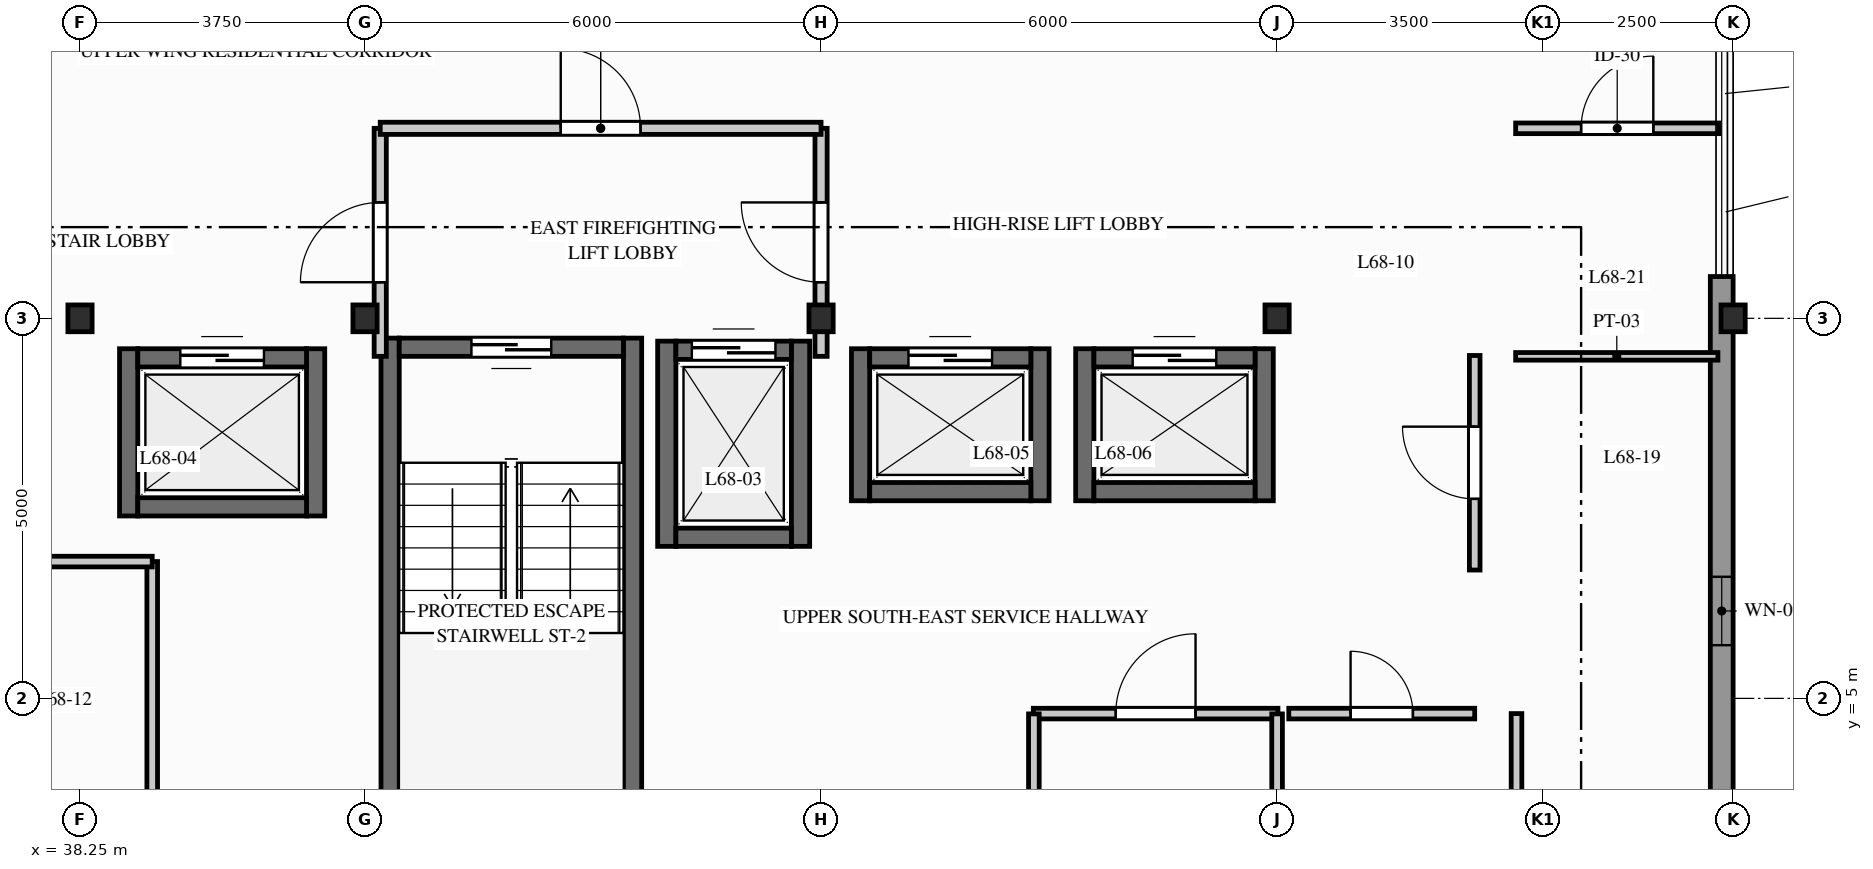
"""IFC4 building model, lengths in metres.
Left out: names, types, materials, properties, quantities, classifications, styles, units other than length and angle.
Written with IfcOpenShell. Run it as: python <this file> out.ifc"""

import sys

from ifc_helpers import new_model, si_unit, direction, frame, frame_2d, origin, origin_2d, place, context, subcontext, project, spatial, rectangle, i_section, extrude, element, fill, save


model = new_model("IFC4")
c1 = context("Model", 3, precision=1e-05, world=origin(), true_north=direction((0.0, 1.0)))
c2 = subcontext(c1, "Body", "Model", "MODEL_VIEW")
j1 = project(units=[si_unit("LENGTHUNIT", "METRE"), si_unit("PLANEANGLEUNIT", "RADIAN")], contexts=[c1])
p1 = place(None, origin())
s1 = spatial("IfcSite", under=j1, at=p1, CompositionType="ELEMENT")
p2 = place(p1, origin())
s2 = spatial("IfcBuilding", under=s1, at=p2, CompositionType="ELEMENT")
p3 = place(p2, frame((0.0, 0.0, 224.2)))
s3 = spatial("IfcBuildingStorey", under=s2, at=p3, CompositionType="ELEMENT", Elevation=224.2)
for number, where, z_axis, x_axis in (
    (1, (38.25, 10.0, 0.0), (0.0, 0.0, 1.0), (1.0, 0.0, 0.0)),
    (2, (42.0, 10.0, 0.0), (0.0, 0.0, 1.0), (1.0, 0.0, 0.0)),
    (3, (48.0, 10.0, 0.0), (0.0, 0.0, 1.0), (1.0, 0.0, 0.0)),
    (4, (54.0, 10.0, 0.0), (0.0, 0.0, 1.0), (1.0, 0.0, 0.0)),
    (5, (60.0, 10.0, 0.0), (0.0, 0.0, 1.0), (1.0, 0.0, 0.0)),
):
    element("IfcColumn", number, at=place(p3, frame(where, z_axis=z_axis, x_axis=x_axis)), inside=s3, PredefinedType="COLUMN", context=c2, shape_type="SweptSolid", body=[
        extrude(i_section(OverallWidth=0.318, OverallDepth=0.353, WebThickness=0.023, FlangeThickness=0.038, FilletRadius=0.015, at=origin_2d()), origin(), (0.0, 0.0, 1.0), 3.1),
    ])
p4 = place(p3, frame((59.85, 2.5, 0.0), z_axis=(0.0, 0.0, 1.0), x_axis=(0.0, 1.0, 0.0)))
e6 = element("IfcWall", 6, at=p4, inside=s3, PredefinedType="STANDARD", context=c2, shape_type="SweptSolid", body=[
    extrude(rectangle(XDim=8.05, YDim=0.3, at=frame_2d((4.025, 0.0))), origin(), (0.0, 0.0, 1.0), 2.89),
])
p5 = place(p4, frame((3.2, 0.0, 1.2)))
e7 = element("IfcOpeningElement", 7, at=p5, cuts=e6, PredefinedType="OPENING", context=c2, shape_type="SweptSolid", body=[
    extrude(rectangle(XDim=0.9, YDim=0.9, at=frame_2d((0.45, 0.45))), frame((0.0, 0.16, 0.0), z_axis=(0.0, -1.0, 0.0), x_axis=(1.0, 0.0, 0.0)), (0.0, 0.0, 1.0), 0.32),
])
for number, where, z_axis, x_axis in (
    (8, (42.33, 2.54, 0.0), (0.0, 0.0, 1.0), (0.0, 1.0, 0.0)),
    (9, (45.52, 2.54, 0.0), (0.0, 0.0, 1.0), (0.0, 1.0, 0.0)),
):
    element("IfcWall", number, at=place(p3, frame(where, z_axis=z_axis, x_axis=x_axis)), inside=s3, PredefinedType="SHEAR", context=c2, shape_type="SweptSolid", body=[
        extrude(rectangle(XDim=7.2, YDim=0.24, at=frame_2d((3.6, 0.0))), origin(), (0.0, 0.0, 1.0), 2.89),
    ])
p6 = place(p3, frame((45.4, 9.62, 0.0), z_axis=(0.0, 0.0, 1.0), x_axis=(-1.0, 0.0, 0.0)))
e10 = element("IfcWall", 10, at=p6, inside=s3, PredefinedType="SHEAR", context=c2, shape_type="SweptSolid", body=[
    extrude(rectangle(XDim=2.95, YDim=0.24, at=frame_2d((1.475, 0.0))), origin(), (0.0, 0.0, 1.0), 2.89),
])
p7 = place(p6, frame((0.95, 0.0, 0.0)))
e11 = element("IfcOpeningElement", 11, at=p7, cuts=e10, PredefinedType="OPENING", context=c2, shape_type="SweptSolid", body=[
    extrude(rectangle(XDim=1.05, YDim=2.06, at=frame_2d((0.525, 1.03))), frame((0.0, 0.13, 0.0), z_axis=(0.0, -1.0, 0.0), x_axis=(1.0, 0.0, 0.0)), (0.0, 0.0, 1.0), 0.26),
])
for number, where, z_axis, x_axis in (
    (12, (45.97, 7.0, 0.0), (0.0, 0.0, 1.0), (0.0, 1.0, 0.0)),
    (13, (47.73, 7.0, 0.0), (0.0, 0.0, 1.0), (0.0, 1.0, 0.0)),
):
    element("IfcWall", number, at=place(p3, frame(where, z_axis=z_axis, x_axis=x_axis)), inside=s3, PredefinedType="SHEAR", context=c2, shape_type="SweptSolid", body=[
        extrude(rectangle(XDim=2.7, YDim=0.24, at=frame_2d((1.35, 0.0))), origin(), (0.0, 0.0, 1.0), 2.89),
    ])
p8 = place(p3, frame((46.09, 7.12, 0.0), z_axis=(0.0, 0.0, 1.0), x_axis=(1.0, 0.0, 0.0)))
e14 = element("IfcWall", 14, at=p8, inside=s3, PredefinedType="SHEAR", context=c2, shape_type="SweptSolid", body=[
    extrude(rectangle(XDim=1.52, YDim=0.24, at=frame_2d((0.76, 0.0))), origin(), (0.0, 0.0, 1.0), 2.89),
])
p9 = place(p3, frame((46.09, 9.58, 0.0), z_axis=(0.0, 0.0, 1.0), x_axis=(1.0, 0.0, 0.0)))
e15 = element("IfcWall", 15, at=p9, inside=s3, PredefinedType="SHEAR", context=c2, shape_type="SweptSolid", body=[
    extrude(rectangle(XDim=1.52, YDim=0.24, at=frame_2d((0.76, 0.0))), origin(), (0.0, 0.0, 1.0), 2.89),
])
p10 = place(p9, frame((0.21, 0.0, 0.0)))
e16 = element("IfcOpeningElement", 16, at=p10, cuts=e15, PredefinedType="OPENING", context=c2, shape_type="SweptSolid", body=[
    extrude(rectangle(XDim=1.1, YDim=2.06, at=frame_2d((0.55, 1.03))), frame((0.0, 0.13, 0.0), z_axis=(0.0, -1.0, 0.0), x_axis=(1.0, 0.0, 0.0)), (0.0, 0.0, 1.0), 0.26),
])
for number, where, z_axis, x_axis in (
    (17, (38.89, 7.4, 0.0), (0.0, 0.0, 1.0), (0.0, 1.0, 0.0)),
    (18, (41.35, 7.4, 0.0), (0.0, 0.0, 1.0), (0.0, 1.0, 0.0)),
):
    element("IfcWall", number, at=place(p3, frame(where, z_axis=z_axis, x_axis=x_axis)), inside=s3, PredefinedType="SHEAR", context=c2, shape_type="SweptSolid", body=[
        extrude(rectangle(XDim=2.2, YDim=0.24, at=frame_2d((1.1, 0.0))), origin(), (0.0, 0.0, 1.0), 2.89),
    ])
p11 = place(p3, frame((39.01, 7.52, 0.0), z_axis=(0.0, 0.0, 1.0), x_axis=(1.0, 0.0, 0.0)))
e19 = element("IfcWall", 19, at=p11, inside=s3, PredefinedType="SHEAR", context=c2, shape_type="SweptSolid", body=[
    extrude(rectangle(XDim=2.22, YDim=0.24, at=frame_2d((1.11, 0.0))), origin(), (0.0, 0.0, 1.0), 2.89),
])
p12 = place(p3, frame((39.01, 9.48, 0.0), z_axis=(0.0, 0.0, 1.0), x_axis=(1.0, 0.0, 0.0)))
e20 = element("IfcWall", 20, at=p12, inside=s3, PredefinedType="SHEAR", context=c2, shape_type="SweptSolid", body=[
    extrude(rectangle(XDim=2.22, YDim=0.24, at=frame_2d((1.11, 0.0))), origin(), (0.0, 0.0, 1.0), 2.89),
])
p13 = place(p12, frame((0.56, 0.0, 0.0)))
e21 = element("IfcOpeningElement", 21, at=p13, cuts=e20, PredefinedType="OPENING", context=c2, shape_type="SweptSolid", body=[
    extrude(rectangle(XDim=1.1, YDim=2.06, at=frame_2d((0.55, 1.03))), frame((0.0, 0.13, 0.0), z_axis=(0.0, -1.0, 0.0), x_axis=(1.0, 0.0, 0.0)), (0.0, 0.0, 1.0), 0.26),
])
for number, where, z_axis, x_axis in (
    (22, (48.52, 7.6, 0.0), (0.0, 0.0, 1.0), (0.0, 1.0, 0.0)),
    (23, (50.88, 7.6, 0.0), (0.0, 0.0, 1.0), (0.0, 1.0, 0.0)),
):
    element("IfcWall", number, at=place(p3, frame(where, z_axis=z_axis, x_axis=x_axis)), inside=s3, PredefinedType="SHEAR", context=c2, shape_type="SweptSolid", body=[
        extrude(rectangle(XDim=2.0, YDim=0.24, at=frame_2d((1.0, 0.0))), origin(), (0.0, 0.0, 1.0), 2.89),
    ])
p14 = place(p3, frame((48.64, 7.72, 0.0), z_axis=(0.0, 0.0, 1.0), x_axis=(1.0, 0.0, 0.0)))
e24 = element("IfcWall", 24, at=p14, inside=s3, PredefinedType="SHEAR", context=c2, shape_type="SweptSolid", body=[
    extrude(rectangle(XDim=2.12, YDim=0.24, at=frame_2d((1.06, 0.0))), origin(), (0.0, 0.0, 1.0), 2.89),
])
p15 = place(p3, frame((48.64, 9.48, 0.0), z_axis=(0.0, 0.0, 1.0), x_axis=(1.0, 0.0, 0.0)))
e25 = element("IfcWall", 25, at=p15, inside=s3, PredefinedType="SHEAR", context=c2, shape_type="SweptSolid", body=[
    extrude(rectangle(XDim=2.12, YDim=0.24, at=frame_2d((1.06, 0.0))), origin(), (0.0, 0.0, 1.0), 2.89),
])
p16 = place(p15, frame((0.51, 0.0, 0.0)))
e26 = element("IfcOpeningElement", 26, at=p16, cuts=e25, PredefinedType="OPENING", context=c2, shape_type="SweptSolid", body=[
    extrude(rectangle(XDim=1.1, YDim=2.06, at=frame_2d((0.55, 1.03))), frame((0.0, 0.13, 0.0), z_axis=(0.0, -1.0, 0.0), x_axis=(1.0, 0.0, 0.0)), (0.0, 0.0, 1.0), 0.26),
])
for number, where, z_axis, x_axis in (
    (27, (51.47, 7.6, 0.0), (0.0, 0.0, 1.0), (0.0, 1.0, 0.0)),
    (28, (53.83, 7.6, 0.0), (0.0, 0.0, 1.0), (0.0, 1.0, 0.0)),
):
    element("IfcWall", number, at=place(p3, frame(where, z_axis=z_axis, x_axis=x_axis)), inside=s3, PredefinedType="SHEAR", context=c2, shape_type="SweptSolid", body=[
        extrude(rectangle(XDim=2.0, YDim=0.24, at=frame_2d((1.0, 0.0))), origin(), (0.0, 0.0, 1.0), 2.89),
    ])
p17 = place(p3, frame((51.59, 7.72, 0.0), z_axis=(0.0, 0.0, 1.0), x_axis=(1.0, 0.0, 0.0)))
e29 = element("IfcWall", 29, at=p17, inside=s3, PredefinedType="SHEAR", context=c2, shape_type="SweptSolid", body=[
    extrude(rectangle(XDim=2.12, YDim=0.24, at=frame_2d((1.06, 0.0))), origin(), (0.0, 0.0, 1.0), 2.89),
])
p18 = place(p3, frame((51.59, 9.48, 0.0), z_axis=(0.0, 0.0, 1.0), x_axis=(1.0, 0.0, 0.0)))
e30 = element("IfcWall", 30, at=p18, inside=s3, PredefinedType="SHEAR", context=c2, shape_type="SweptSolid", body=[
    extrude(rectangle(XDim=2.12, YDim=0.24, at=frame_2d((1.06, 0.0))), origin(), (0.0, 0.0, 1.0), 2.89),
])
p19 = place(p18, frame((0.51, 0.0, 0.0)))
e31 = element("IfcOpeningElement", 31, at=p19, cuts=e30, PredefinedType="OPENING", context=c2, shape_type="SweptSolid", body=[
    extrude(rectangle(XDim=1.1, YDim=2.06, at=frame_2d((0.55, 1.03))), frame((0.0, 0.13, 0.0), z_axis=(0.0, -1.0, 0.0), x_axis=(1.0, 0.0, 0.0)), (0.0, 0.0, 1.0), 0.26),
])
p20 = place(p3, frame((50.793, 4.8, 0.0), z_axis=(0.0, 0.0, 1.0), x_axis=(1.0, 0.0, 0.0)))
e32 = element("IfcWall", 32, at=p20, inside=s3, PredefinedType="PARTITIONING", context=c2, shape_type="SweptSolid", body=[
    extrude(rectangle(XDim=3.219, YDim=0.14, at=frame_2d((1.609, 0.0))), origin(), (0.0, 0.0, 1.0), 2.325),
])
p21 = place(p20, frame((1.084, 0.0, 0.0)))
e33 = element("IfcOpeningElement", 33, at=p21, cuts=e32, PredefinedType="OPENING", context=c2, shape_type="SweptSolid", body=[
    extrude(rectangle(XDim=1.05, YDim=2.06, at=frame_2d((0.525, 1.03))), frame((0.0, 0.08, 0.0), z_axis=(0.0, -1.0, 0.0), x_axis=(1.0, 0.0, 0.0)), (0.0, 0.0, 1.0), 0.16),
])
p22 = place(p3, frame((54.154, 4.8, 0.0), z_axis=(0.0, 0.0, 1.0), x_axis=(1.0, 0.0, 0.0)))
e34 = element("IfcWall", 34, at=p22, inside=s3, PredefinedType="PARTITIONING", context=c2, shape_type="SweptSolid", body=[
    extrude(rectangle(XDim=2.446, YDim=0.14, at=frame_2d((1.223, 0.0))), origin(), (0.0, 0.0, 1.0), 2.89),
])
p23 = place(p22, frame((0.813, 0.0, 0.0)))
e35 = element("IfcOpeningElement", 35, at=p23, cuts=e34, PredefinedType="OPENING", context=c2, shape_type="SweptSolid", body=[
    extrude(rectangle(XDim=0.82, YDim=2.02, at=frame_2d((0.41, 1.01))), frame((0.0, 0.08, 0.0), z_axis=(0.0, -1.0, 0.0), x_axis=(1.0, 0.0, 0.0)), (0.0, 0.0, 1.0), 0.16),
])
p24 = place(p3, frame((56.6, 6.689, 0.0), z_axis=(0.0, 0.0, 1.0), x_axis=(0.0, 1.0, 0.0)))
e36 = element("IfcWall", 36, at=p24, inside=s3, PredefinedType="PARTITIONING", context=c2, shape_type="SweptSolid", body=[
    extrude(rectangle(XDim=2.823, YDim=0.14, at=frame_2d((1.411, 0.0))), origin(), (0.0, 0.0, 1.0), 2.89),
])
p25 = place(p24, frame((0.936, 0.0, 0.0)))
e37 = element("IfcOpeningElement", 37, at=p25, cuts=e36, PredefinedType="OPENING", context=c2, shape_type="SweptSolid", body=[
    extrude(rectangle(XDim=0.95, YDim=2.05, at=frame_2d((0.475, 1.025))), frame((0.0, 0.08, 0.0), z_axis=(0.0, -1.0, 0.0), x_axis=(1.0, 0.0, 0.0)), (0.0, 0.0, 1.0), 0.16),
])
p26 = place(p3, frame((50.8, 0.18, 0.0), z_axis=(0.0, 0.0, 1.0), x_axis=(0.0, 1.0, 0.0)))
e38 = element("IfcWall", 38, at=p26, inside=s3, PredefinedType="PARTITIONING", context=c2, shape_type="SweptSolid", body=[
    extrude(rectangle(XDim=4.616, YDim=0.14, at=frame_2d((2.308, 0.0))), origin(), (0.0, 0.0, 1.0), 2.89),
])
p27 = place(p3, frame((54.0, 0.18, 0.0), z_axis=(0.0, 0.0, 1.0), x_axis=(0.0, 1.0, 0.0)))
e39 = element("IfcWall", 39, at=p27, inside=s3, PredefinedType="PARTITIONING", context=c2, shape_type="SweptSolid", body=[
    extrude(rectangle(XDim=4.616, YDim=0.14, at=frame_2d((2.308, 0.0))), origin(), (0.0, 0.0, 1.0), 2.325),
])
p28 = place(p3, frame((42.2, 9.5, 0.0), z_axis=(0.0, 0.0, 1.0), x_axis=(0.0, 1.0, 0.0)))
e40 = element("IfcWall", 40, at=p28, inside=s3, PredefinedType="PARTITIONING", context=c2, shape_type="SweptSolid", body=[
    extrude(rectangle(XDim=3.0, YDim=0.16, at=frame_2d((1.5, 0.0))), origin(), (0.0, 0.0, 1.0), 2.325),
])
p29 = place(p28, frame((0.975, 0.0, 0.0)))
e41 = element("IfcOpeningElement", 41, at=p29, cuts=e40, PredefinedType="OPENING", context=c2, shape_type="SweptSolid", body=[
    extrude(rectangle(XDim=1.05, YDim=2.06, at=frame_2d((0.525, 1.03))), frame((0.0, 0.09, 0.0), z_axis=(0.0, -1.0, 0.0), x_axis=(1.0, 0.0, 0.0)), (0.0, 0.0, 1.0), 0.18),
])
p30 = place(p3, frame((48.0, 9.5, 0.0), z_axis=(0.0, 0.0, 1.0), x_axis=(0.0, 1.0, 0.0)))
e42 = element("IfcWall", 42, at=p30, inside=s3, PredefinedType="PARTITIONING", context=c2, shape_type="SweptSolid", body=[
    extrude(rectangle(XDim=3.0, YDim=0.16, at=frame_2d((1.5, 0.0))), origin(), (0.0, 0.0, 1.0), 2.325),
])
p31 = place(p30, frame((0.975, 0.0, 0.0)))
e43 = element("IfcOpeningElement", 43, at=p31, cuts=e42, PredefinedType="OPENING", context=c2, shape_type="SweptSolid", body=[
    extrude(rectangle(XDim=1.05, YDim=2.06, at=frame_2d((0.525, 1.03))), frame((0.0, 0.09, 0.0), z_axis=(0.0, -1.0, 0.0), x_axis=(1.0, 0.0, 0.0)), (0.0, 0.0, 1.0), 0.18),
])
p32 = place(p3, frame((42.2, 12.5, 0.0), z_axis=(0.0, 0.0, 1.0), x_axis=(1.0, 0.0, 0.0)))
e44 = element("IfcWall", 44, at=p32, inside=s3, PredefinedType="PARTITIONING", context=c2, shape_type="SweptSolid", body=[
    extrude(rectangle(XDim=5.8, YDim=0.16, at=frame_2d((2.9, 0.0))), origin(), (0.0, 0.0, 1.0), 2.325),
])
p33 = place(p32, frame((2.375, 0.0, 0.0)))
e45 = element("IfcOpeningElement", 45, at=p33, cuts=e44, PredefinedType="OPENING", context=c2, shape_type="SweptSolid", body=[
    extrude(rectangle(XDim=1.05, YDim=2.06, at=frame_2d((0.525, 1.03))), frame((0.0, 0.09, 0.0), z_axis=(0.0, -1.0, 0.0), x_axis=(1.0, 0.0, 0.0)), (0.0, 0.0, 1.0), 0.18),
])
p34 = place(p3, frame((57.139, 9.5, 0.0), z_axis=(0.0, 0.0, 1.0), x_axis=(1.0, 0.0, 0.0)))
e46 = element("IfcWall", 46, at=p34, inside=s3, PredefinedType="PARTITIONING", context=c2, shape_type="SweptSolid", body=[
    extrude(rectangle(XDim=2.661, YDim=0.1, at=frame_2d((1.331, 0.0))), origin(), (0.0, 0.0, 1.0), 2.89),
])
p35 = place(p3, frame((57.139, 12.5, 0.0), z_axis=(0.0, 0.0, 1.0), x_axis=(1.0, 0.0, 0.0)))
e47 = element("IfcWall", 47, at=p35, inside=s3, PredefinedType="PARTITIONING", context=c2, shape_type="SweptSolid", body=[
    extrude(rectangle(XDim=2.673, YDim=0.14, at=frame_2d((1.336, 0.0))), origin(), (0.0, 0.0, 1.0), 2.89),
])
p36 = place(p35, frame((0.861, 0.0, 0.0)))
e48 = element("IfcOpeningElement", 48, at=p36, cuts=e47, PredefinedType="OPENING", context=c2, shape_type="SweptSolid", body=[
    extrude(rectangle(XDim=0.95, YDim=2.05, at=frame_2d((0.475, 1.025))), frame((0.0, 0.08, 0.0), z_axis=(0.0, -1.0, 0.0), x_axis=(1.0, 0.0, 0.0)), (0.0, 0.0, 1.0), 0.16),
])
p37 = place(p3, frame((39.2, 2.44, 0.0), z_axis=(0.0, 0.0, 1.0), x_axis=(0.0, 1.0, 0.0)))
e49 = element("IfcWall", 49, at=p37, inside=s3, PredefinedType="PARTITIONING", context=c2, shape_type="SweptSolid", body=[
    extrude(rectangle(XDim=4.36, YDim=0.14, at=frame_2d((2.18, 0.0))), origin(), (0.0, 0.0, 1.0), 2.89),
])
p38 = place(p3, frame((37.14, 6.8, 0.0), z_axis=(0.0, 0.0, 1.0), x_axis=(1.0, 0.0, 0.0)))
e50 = element("IfcWall", 50, at=p38, inside=s3, PredefinedType="PARTITIONING", context=c2, shape_type="SweptSolid", body=[
    extrude(rectangle(XDim=2.06, YDim=0.14, at=frame_2d((1.03, 0.0))), origin(), (0.0, 0.0, 1.0), 2.325),
])
p39 = place(p3, frame((57.15, 0.39, 0.0), z_axis=(0.0, 0.0, 1.0), x_axis=(0.0, 1.0, 0.0)))
e51 = element("IfcWall", 51, at=p39, inside=s3, PredefinedType="PARTITIONING", context=c2, shape_type="SweptSolid", body=[
    extrude(rectangle(XDim=4.41, YDim=0.14, at=frame_2d((2.205, 0.0))), origin(), (0.0, 0.0, 1.0), 2.89),
])
p40 = place(p5, origin())
e52 = element("IfcWindow", 52, at=p40, inside=s3, PartitioningType="SINGLE_PANEL", PredefinedType="WINDOW", context=c2, shape_type="SweptSolid", body=[
    extrude(rectangle(XDim=0.9, YDim=0.9, at=frame_2d((0.45, 0.45))), frame((0.0, 0.03, 0.0), z_axis=(0.0, -1.0, 0.0), x_axis=(1.0, 0.0, 0.0)), (0.0, 0.0, 1.0), 0.06),
])
fill(e7, e52)
p41 = place(p7, origin())
e53 = element("IfcDoor", 53, at=p41, inside=s3, OperationType="SINGLE_SWING_LEFT", PredefinedType="DOOR", context=c2, shape_type="SweptSolid", body=[
    extrude(rectangle(XDim=1.05, YDim=2.06, at=frame_2d((0.525, 1.03))), frame((0.0, 0.025, 0.0), z_axis=(0.0, -1.0, 0.0), x_axis=(1.0, 0.0, 0.0)), (0.0, 0.0, 1.0), 0.05),
])
fill(e11, e53)
p42 = place(p10, origin())
e54 = element("IfcDoor", 54, at=p42, inside=s3, OperationType="SLIDING_TO_LEFT", PredefinedType="DOOR", context=c2, shape_type="SweptSolid", body=[
    extrude(rectangle(XDim=1.1, YDim=2.06, at=frame_2d((0.55, 1.03))), frame((0.0, 0.025, 0.0), z_axis=(0.0, -1.0, 0.0), x_axis=(1.0, 0.0, 0.0)), (0.0, 0.0, 1.0), 0.05),
])
fill(e16, e54)
p43 = place(p13, origin())
e55 = element("IfcDoor", 55, at=p43, inside=s3, OperationType="SLIDING_TO_RIGHT", PredefinedType="DOOR", context=c2, shape_type="SweptSolid", body=[
    extrude(rectangle(XDim=1.1, YDim=2.06, at=frame_2d((0.55, 1.03))), frame((0.0, 0.025, 0.0), z_axis=(0.0, -1.0, 0.0), x_axis=(1.0, 0.0, 0.0)), (0.0, 0.0, 1.0), 0.05),
])
fill(e21, e55)
p44 = place(p16, origin())
e56 = element("IfcDoor", 56, at=p44, inside=s3, OperationType="SLIDING_TO_LEFT", PredefinedType="DOOR", context=c2, shape_type="SweptSolid", body=[
    extrude(rectangle(XDim=1.1, YDim=2.06, at=frame_2d((0.55, 1.03))), frame((0.0, 0.025, 0.0), z_axis=(0.0, -1.0, 0.0), x_axis=(1.0, 0.0, 0.0)), (0.0, 0.0, 1.0), 0.05),
])
fill(e26, e56)
p45 = place(p19, origin())
e57 = element("IfcDoor", 57, at=p45, inside=s3, OperationType="SLIDING_TO_RIGHT", PredefinedType="DOOR", context=c2, shape_type="SweptSolid", body=[
    extrude(rectangle(XDim=1.1, YDim=2.06, at=frame_2d((0.55, 1.03))), frame((0.0, 0.025, 0.0), z_axis=(0.0, -1.0, 0.0), x_axis=(1.0, 0.0, 0.0)), (0.0, 0.0, 1.0), 0.05),
])
fill(e31, e57)
p46 = place(p21, origin())
e58 = element("IfcDoor", 58, at=p46, inside=s3, OperationType="SINGLE_SWING_RIGHT", PredefinedType="DOOR", context=c2, shape_type="SweptSolid", body=[
    extrude(rectangle(XDim=1.05, YDim=2.06, at=frame_2d((0.525, 1.03))), frame((0.0, 0.025, 0.0), z_axis=(0.0, -1.0, 0.0), x_axis=(1.0, 0.0, 0.0)), (0.0, 0.0, 1.0), 0.05),
])
fill(e33, e58)
p47 = place(p23, origin())
e59 = element("IfcDoor", 59, at=p47, inside=s3, OperationType="SINGLE_SWING_LEFT", PredefinedType="DOOR", context=c2, shape_type="SweptSolid", body=[
    extrude(rectangle(XDim=0.82, YDim=2.02, at=frame_2d((0.41, 1.01))), frame((0.0, 0.025, 0.0), z_axis=(0.0, -1.0, 0.0), x_axis=(1.0, 0.0, 0.0)), (0.0, 0.0, 1.0), 0.05),
])
fill(e35, e59)
p48 = place(p25, origin())
e60 = element("IfcDoor", 60, at=p48, inside=s3, OperationType="SINGLE_SWING_RIGHT", PredefinedType="DOOR", context=c2, shape_type="SweptSolid", body=[
    extrude(rectangle(XDim=0.95, YDim=2.05, at=frame_2d((0.475, 1.025))), frame((0.0, 0.025, 0.0), z_axis=(0.0, -1.0, 0.0), x_axis=(1.0, 0.0, 0.0)), (0.0, 0.0, 1.0), 0.05),
])
fill(e37, e60)
p49 = place(p29, origin())
e61 = element("IfcDoor", 61, at=p49, inside=s3, OperationType="SINGLE_SWING_LEFT", PredefinedType="DOOR", context=c2, shape_type="SweptSolid", body=[
    extrude(rectangle(XDim=1.05, YDim=2.06, at=frame_2d((0.525, 1.03))), frame((0.0, 0.025, 0.0), z_axis=(0.0, -1.0, 0.0), x_axis=(1.0, 0.0, 0.0)), (0.0, 0.0, 1.0), 0.05),
])
fill(e41, e61)
p50 = place(p31, origin())
e62 = element("IfcDoor", 62, at=p50, inside=s3, OperationType="SINGLE_SWING_RIGHT", PredefinedType="DOOR", context=c2, shape_type="SweptSolid", body=[
    extrude(rectangle(XDim=1.05, YDim=2.06, at=frame_2d((0.525, 1.03))), frame((0.0, 0.025, 0.0), z_axis=(0.0, -1.0, 0.0), x_axis=(1.0, 0.0, 0.0)), (0.0, 0.0, 1.0), 0.05),
])
fill(e43, e62)
p51 = place(p33, origin())
e63 = element("IfcDoor", 63, at=p51, inside=s3, OperationType="SINGLE_SWING_LEFT", PredefinedType="DOOR", context=c2, shape_type="SweptSolid", body=[
    extrude(rectangle(XDim=1.05, YDim=2.06, at=frame_2d((0.525, 1.03))), frame((0.0, 0.025, 0.0), z_axis=(0.0, -1.0, 0.0), x_axis=(1.0, 0.0, 0.0)), (0.0, 0.0, 1.0), 0.05),
])
fill(e45, e63)
p52 = place(p36, origin())
e64 = element("IfcDoor", 64, at=p52, inside=s3, OperationType="SINGLE_SWING_RIGHT", PredefinedType="DOOR", context=c2, shape_type="SweptSolid", body=[
    extrude(rectangle(XDim=0.95, YDim=2.05, at=frame_2d((0.475, 1.025))), frame((0.0, 0.025, 0.0), z_axis=(0.0, -1.0, 0.0), x_axis=(1.0, 0.0, 0.0)), (0.0, 0.0, 1.0), 0.05),
])
fill(e48, e64)
save(model, sys.argv[1])
